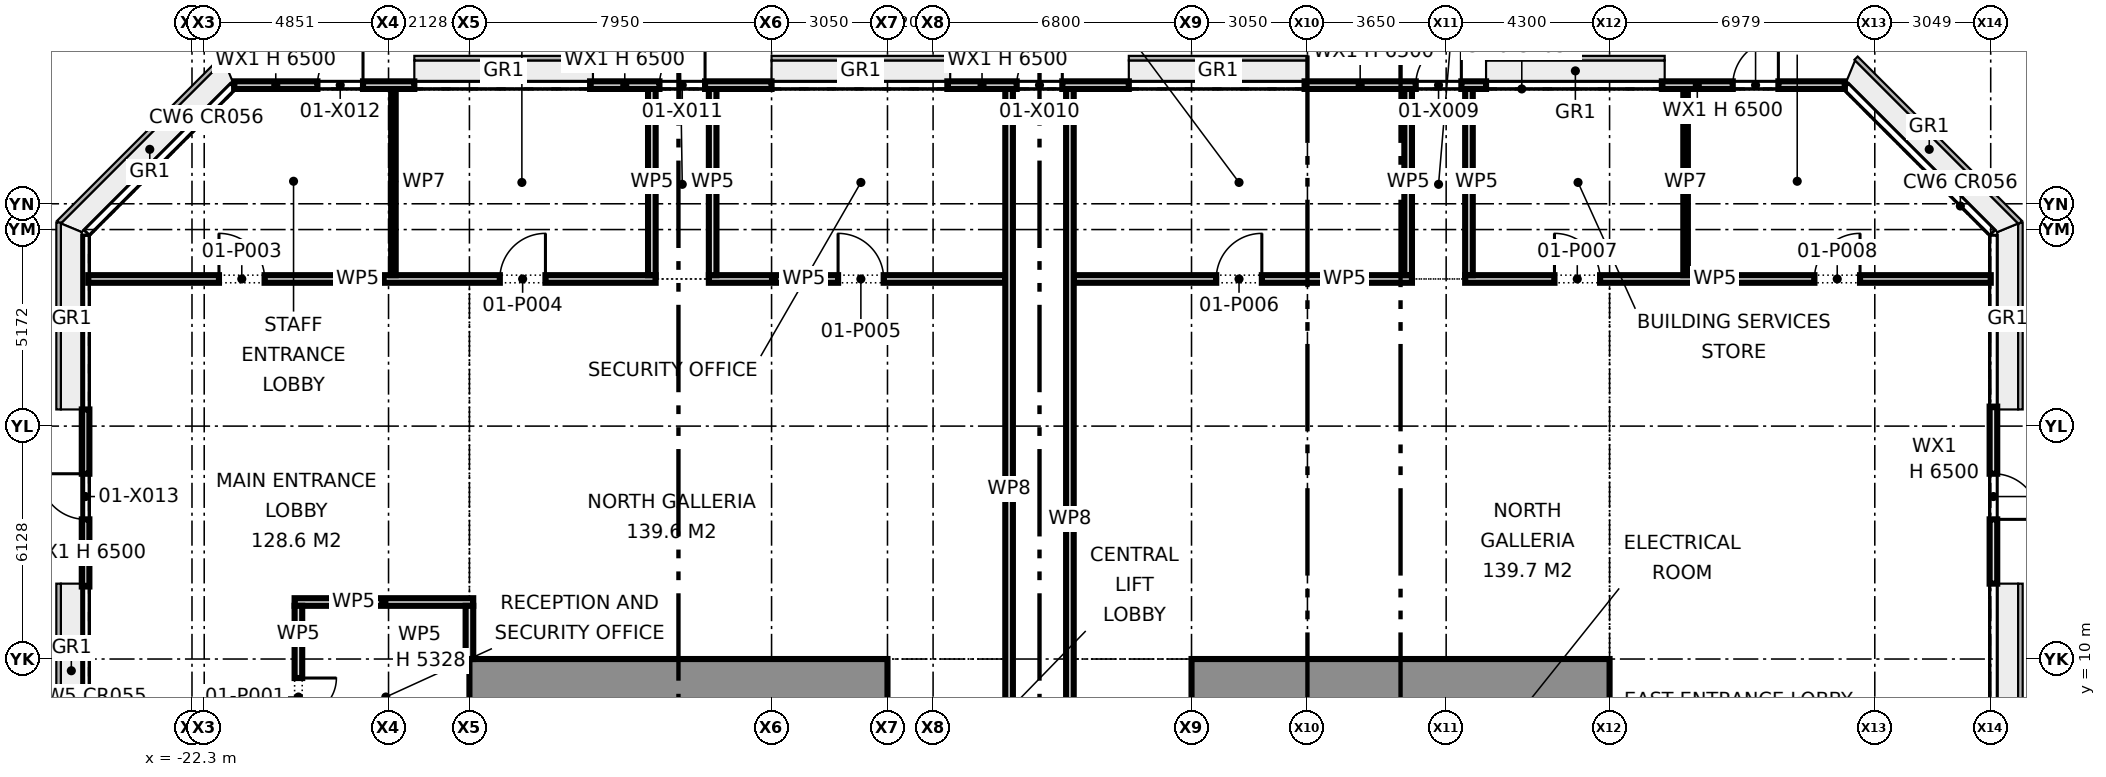
"""IFC4 building model, lengths in metres.
Left out: names, types, materials, properties, quantities, classifications, styles, units other than length and angle.
Written with IfcOpenShell. Run it as: python <this file> out.ifc"""

import sys

from ifc_helpers import new_model, si_unit, direction, frame, frame_2d, origin, place, context, subcontext, project, spatial, rectangle, extrude, element, fill, save


model = new_model("IFC4")
c1 = context("Model", 3, precision=1e-05, world=origin(), true_north=direction((0.0, 1.0)))
c2 = subcontext(c1, "Body", "Model", "MODEL_VIEW")
j1 = project(units=[si_unit("LENGTHUNIT", "METRE"), si_unit("PLANEANGLEUNIT", "RADIAN")], contexts=[c1])
p1 = place(None, origin())
s1 = spatial("IfcSite", under=j1, at=p1, CompositionType="ELEMENT")
p2 = place(p1, origin())
s2 = spatial("IfcBuilding", under=s1, at=p2, CompositionType="ELEMENT")
p3 = place(p2, origin())
s3 = spatial("IfcBuildingStorey", under=s2, at=p3, CompositionType="ELEMENT", Elevation=0.0)
p4 = place(p3, frame((25.1, 11.983, 0.0), z_axis=(0.0, 0.0, 1.0), x_axis=(0.0, 1.0, 0.0)))
e1 = element("IfcWall", 1, at=p4, inside=s3, PredefinedType="STANDARD", context=c2, shape_type="SweptSolid", body=[
    extrude(rectangle(XDim=4.658, YDim=0.2, at=frame_2d((2.329, 0.0))), origin(), (0.0, 0.0, 1.0), 6.5),
])
p5 = place(p4, frame((1.692, 0.0, 0.0)))
e2 = element("IfcOpeningElement", 2, at=p5, cuts=e1, PredefinedType="OPENING", context=c2, shape_type="SweptSolid", body=[
    extrude(rectangle(XDim=1.2, YDim=2.1, at=frame_2d((0.6, 1.05))), frame((0.0, 0.11, 0.0), z_axis=(0.0, -1.0, 0.0), x_axis=(1.0, 0.0, 0.0)), (0.0, 0.0, 1.0), 0.22),
])
p6 = place(p3, frame((21.191, 25.1, 0.0), z_axis=(0.0, 0.0, 1.0), x_axis=(-1.0, 0.0, 0.0)))
e3 = element("IfcWall", 3, at=p6, inside=s3, PredefinedType="STANDARD", context=c2, shape_type="SweptSolid", body=[
    extrude(rectangle(XDim=4.816, YDim=0.2, at=frame_2d((2.408, 0.0))), origin(), (0.0, 0.0, 1.0), 6.5),
])
p7 = place(p6, frame((1.75, 0.0, 0.0)))
e4 = element("IfcOpeningElement", 4, at=p7, cuts=e3, PredefinedType="OPENING", context=c2, shape_type="SweptSolid", body=[
    extrude(rectangle(XDim=1.2, YDim=2.1, at=frame_2d((0.6, 1.05))), frame((0.0, 0.11, 0.0), z_axis=(0.0, -1.0, 0.0), x_axis=(1.0, 0.0, 0.0)), (0.0, 0.0, 1.0), 0.22),
])
p8 = place(p3, frame((11.75, 25.1, 0.0), z_axis=(0.0, 0.0, 1.0), x_axis=(-1.0, 0.0, 0.0)))
e5 = element("IfcWall", 5, at=p8, inside=s3, PredefinedType="STANDARD", context=c2, shape_type="SweptSolid", body=[
    extrude(rectangle(XDim=4.775, YDim=0.2, at=frame_2d((2.387, 0.0))), origin(), (0.0, 0.0, 1.0), 6.5),
])
p9 = place(p8, frame((0.65, 0.0, 0.0)))
e6 = element("IfcOpeningElement", 6, at=p9, cuts=e5, PredefinedType="OPENING", context=c2, shape_type="SweptSolid", body=[
    extrude(rectangle(XDim=1.2, YDim=2.1, at=frame_2d((0.6, 1.05))), frame((0.0, 0.11, 0.0), z_axis=(0.0, -1.0, 0.0), x_axis=(1.0, 0.0, 0.0)), (0.0, 0.0, 1.0), 0.22),
])
p10 = place(p3, frame((2.35, 25.1, 0.0), z_axis=(0.0, 0.0, 1.0), x_axis=(-1.0, 0.0, 0.0)))
e7 = element("IfcWall", 7, at=p10, inside=s3, PredefinedType="STANDARD", context=c2, shape_type="SweptSolid", body=[
    extrude(rectangle(XDim=4.775, YDim=0.2, at=frame_2d((2.388, 0.0))), origin(), (0.0, 0.0, 1.0), 6.5),
])
p11 = place(p10, frame((1.75, 0.0, 0.0)))
e8 = element("IfcOpeningElement", 8, at=p11, cuts=e7, PredefinedType="OPENING", context=c2, shape_type="SweptSolid", body=[
    extrude(rectangle(XDim=1.2, YDim=2.1, at=frame_2d((0.6, 1.05))), frame((0.0, 0.11, 0.0), z_axis=(0.0, -1.0, 0.0), x_axis=(1.0, 0.0, 0.0)), (0.0, 0.0, 1.0), 0.22),
])
p12 = place(p3, frame((-7.05, 25.1, 0.0), z_axis=(0.0, 0.0, 1.0), x_axis=(-1.0, 0.0, 0.0)))
e9 = element("IfcWall", 9, at=p12, inside=s3, PredefinedType="STANDARD", context=c2, shape_type="SweptSolid", body=[
    extrude(rectangle(XDim=4.775, YDim=0.2, at=frame_2d((2.387, 0.0))), origin(), (0.0, 0.0, 1.0), 6.5),
])
p13 = place(p12, frame((1.75, 0.0, 0.0)))
e10 = element("IfcOpeningElement", 10, at=p13, cuts=e9, PredefinedType="OPENING", context=c2, shape_type="SweptSolid", body=[
    extrude(rectangle(XDim=1.2, YDim=2.1, at=frame_2d((0.6, 1.05))), frame((0.0, 0.11, 0.0), z_axis=(0.0, -1.0, 0.0), x_axis=(1.0, 0.0, 0.0)), (0.0, 0.0, 1.0), 0.22),
])
p14 = place(p3, frame((-16.45, 25.1, 0.0), z_axis=(0.0, 0.0, 1.0), x_axis=(-1.0, 0.0, 0.0)))
e11 = element("IfcWall", 11, at=p14, inside=s3, PredefinedType="STANDARD", context=c2, shape_type="SweptSolid", body=[
    extrude(rectangle(XDim=4.741, YDim=0.2, at=frame_2d((2.371, 0.0))), origin(), (0.0, 0.0, 1.0), 6.5),
])
p15 = place(p14, frame((1.35, 0.0, 0.0)))
e12 = element("IfcOpeningElement", 12, at=p15, cuts=e11, PredefinedType="OPENING", context=c2, shape_type="SweptSolid", body=[
    extrude(rectangle(XDim=1.2, YDim=2.1, at=frame_2d((0.6, 1.05))), frame((0.0, 0.11, 0.0), z_axis=(0.0, -1.0, 0.0), x_axis=(1.0, 0.0, 0.0)), (0.0, 0.0, 1.0), 0.22),
])
p16 = place(p3, frame((-25.1, 16.567, 0.0), z_axis=(0.0, 0.0, 1.0), x_axis=(0.0, -1.0, 0.0)))
e13 = element("IfcWall", 13, at=p16, inside=s3, PredefinedType="STANDARD", context=c2, shape_type="SweptSolid", body=[
    extrude(rectangle(XDim=4.658, YDim=0.2, at=frame_2d((2.329, 0.0))), origin(), (0.0, 0.0, 1.0), 6.5),
])
p17 = place(p16, frame((1.692, 0.0, 0.0)))
e14 = element("IfcOpeningElement", 14, at=p17, cuts=e13, PredefinedType="OPENING", context=c2, shape_type="SweptSolid", body=[
    extrude(rectangle(XDim=1.2, YDim=2.1, at=frame_2d((0.6, 1.05))), frame((0.0, 0.11, 0.0), z_axis=(0.0, -1.0, 0.0), x_axis=(1.0, 0.0, 0.0)), (0.0, 0.0, 1.0), 0.22),
])
for number, where, z_axis, x_axis in (
    (15, (-15.0, 9.45, 0.0), (0.0, 0.0, 1.0), (1.0, 0.0, 0.0)),
    (16, (15.0, 9.45, 0.0), (0.0, 0.0, 1.0), (-1.0, 0.0, 0.0)),
):
    element("IfcWall", number, at=place(p3, frame(where, z_axis=z_axis, x_axis=x_axis)), inside=s3, PredefinedType="SHEAR", context=c2, shape_type="SweptSolid", body=[
        extrude(rectangle(XDim=11.0, YDim=1.1, at=frame_2d((5.5, 0.0))), origin(), (0.0, 0.0, 1.0), 6.275),
    ])
p18 = place(p3, frame((-19.6, 11.5, 0.0), z_axis=(0.0, 0.0, 1.0), x_axis=(1.0, 0.0, 0.0)))
e17 = element("IfcWall", 17, at=p18, inside=s3, PredefinedType="PARTITIONING", context=c2, shape_type="SweptSolid", body=[
    extrude(rectangle(XDim=4.7, YDim=0.2, at=frame_2d((2.35, 0.0))), origin(), (0.0, 0.0, 1.0), 6.275),
])
p19 = place(p3, frame((-25.03, 20.0, 0.0), z_axis=(0.0, 0.0, 1.0), x_axis=(1.0, 0.0, 0.0)))
e18 = element("IfcWall", 18, at=p19, inside=s3, PredefinedType="PARTITIONING", context=c2, shape_type="SweptSolid", body=[
    extrude(rectangle(XDim=14.93, YDim=0.2, at=frame_2d((7.465, 0.0))), origin(), (0.0, 0.0, 1.0), 6.275),
])
p20 = place(p19, frame((3.44, 0.0, 0.0)))
e19 = element("IfcOpeningElement", 19, at=p20, cuts=e18, PredefinedType="OPENING", context=c2, shape_type="SweptSolid", body=[
    extrude(rectangle(XDim=1.2, YDim=2.1, at=frame_2d((0.6, 1.05))), frame((0.0, 0.11, 0.0), z_axis=(0.0, -1.0, 0.0), x_axis=(1.0, 0.0, 0.0)), (0.0, 0.0, 1.0), 0.22),
])
p21 = place(p19, frame((10.83, 0.0, 0.0)))
e20 = element("IfcOpeningElement", 20, at=p21, cuts=e18, PredefinedType="OPENING", context=c2, shape_type="SweptSolid", body=[
    extrude(rectangle(XDim=1.2, YDim=2.1, at=frame_2d((0.6, 1.05))), frame((0.0, 0.11, 0.0), z_axis=(0.0, -1.0, 0.0), x_axis=(1.0, 0.0, 0.0)), (0.0, 0.0, 1.0), 0.22),
])
p22 = place(p3, frame((-8.7, 20.0, 0.0), z_axis=(0.0, 0.0, 1.0), x_axis=(1.0, 0.0, 0.0)))
e21 = element("IfcWall", 21, at=p22, inside=s3, PredefinedType="PARTITIONING", context=c2, shape_type="SweptSolid", body=[
    extrude(rectangle(XDim=7.8, YDim=0.2, at=frame_2d((3.9, 0.0))), origin(), (0.0, 0.0, 1.0), 6.275),
])
p23 = place(p22, frame((3.4, 0.0, 0.0)))
e22 = element("IfcOpeningElement", 22, at=p23, cuts=e21, PredefinedType="OPENING", context=c2, shape_type="SweptSolid", body=[
    extrude(rectangle(XDim=1.2, YDim=2.1, at=frame_2d((0.6, 1.05))), frame((0.0, 0.11, 0.0), z_axis=(0.0, -1.0, 0.0), x_axis=(1.0, 0.0, 0.0)), (0.0, 0.0, 1.0), 0.22),
])
p24 = place(p3, frame((0.9, 20.0, 0.0), z_axis=(0.0, 0.0, 1.0), x_axis=(1.0, 0.0, 0.0)))
e23 = element("IfcWall", 23, at=p24, inside=s3, PredefinedType="PARTITIONING", context=c2, shape_type="SweptSolid", body=[
    extrude(rectangle(XDim=8.9, YDim=0.2, at=frame_2d((4.45, 0.0))), origin(), (0.0, 0.0, 1.0), 6.275),
])
p25 = place(p24, frame((3.75, 0.0, 0.0)))
e24 = element("IfcOpeningElement", 24, at=p25, cuts=e23, PredefinedType="OPENING", context=c2, shape_type="SweptSolid", body=[
    extrude(rectangle(XDim=1.2, YDim=2.1, at=frame_2d((0.6, 1.05))), frame((0.0, 0.11, 0.0), z_axis=(0.0, -1.0, 0.0), x_axis=(1.0, 0.0, 0.0)), (0.0, 0.0, 1.0), 0.22),
])
p26 = place(p3, frame((11.2, 20.0, 0.0), z_axis=(0.0, 0.0, 1.0), x_axis=(1.0, 0.0, 0.0)))
e25 = element("IfcWall", 25, at=p26, inside=s3, PredefinedType="PARTITIONING", context=c2, shape_type="SweptSolid", body=[
    extrude(rectangle(XDim=13.83, YDim=0.2, at=frame_2d((6.915, 0.0))), origin(), (0.0, 0.0, 1.0), 6.275),
])
p27 = place(p26, frame((2.35, 0.0, 0.0)))
e26 = element("IfcOpeningElement", 26, at=p27, cuts=e25, PredefinedType="OPENING", context=c2, shape_type="SweptSolid", body=[
    extrude(rectangle(XDim=1.2, YDim=2.1, at=frame_2d((0.6, 1.05))), frame((0.0, 0.11, 0.0), z_axis=(0.0, -1.0, 0.0), x_axis=(1.0, 0.0, 0.0)), (0.0, 0.0, 1.0), 0.22),
])
p28 = place(p26, frame((9.19, 0.0, 0.0)))
e27 = element("IfcOpeningElement", 27, at=p28, cuts=e25, PredefinedType="OPENING", context=c2, shape_type="SweptSolid", body=[
    extrude(rectangle(XDim=1.2, YDim=2.1, at=frame_2d((0.6, 1.05))), frame((0.0, 0.11, 0.0), z_axis=(0.0, -1.0, 0.0), x_axis=(1.0, 0.0, 0.0)), (0.0, 0.0, 1.0), 0.22),
])
for number, where, z_axis, x_axis in (
    (28, (11.3, 20.1, 0.0), (0.0, 0.0, 1.0), (0.0, 1.0, 0.0)),
    (29, (9.7, 20.1, 0.0), (0.0, 0.0, 1.0), (0.0, 1.0, 0.0)),
    (30, (-8.6, 20.1, 0.0), (0.0, 0.0, 1.0), (0.0, 1.0, 0.0)),
    (31, (-10.2, 20.1, 0.0), (0.0, 0.0, 1.0), (0.0, 1.0, 0.0)),
):
    element("IfcWall", number, at=place(p3, frame(where, z_axis=z_axis, x_axis=x_axis)), inside=s3, PredefinedType="PARTITIONING", context=c2, shape_type="SweptSolid", body=[
        extrude(rectangle(XDim=4.93, YDim=0.2, at=frame_2d((2.465, 0.0))), origin(), (0.0, 0.0, 1.0), 6.275),
    ])
p29 = place(p3, frame((-15.0, 10.0, 0.0), z_axis=(0.0, 0.0, 1.0), x_axis=(0.0, 1.0, 0.0)))
e32 = element("IfcWall", 32, at=p29, inside=s3, PredefinedType="PARTITIONING", context=c2, shape_type="SweptSolid", body=[
    extrude(rectangle(XDim=1.4, YDim=0.2, at=frame_2d((0.7, 0.0))), origin(), (0.0, 0.0, 1.0), 5.328),
])
p30 = place(p3, frame((-19.5, 6.6, 0.0), z_axis=(0.0, 0.0, 1.0), x_axis=(0.0, 1.0, 0.0)))
e33 = element("IfcWall", 33, at=p30, inside=s3, PredefinedType="PARTITIONING", context=c2, shape_type="SweptSolid", body=[
    extrude(rectangle(XDim=4.8, YDim=0.2, at=frame_2d((2.4, 0.0))), origin(), (0.0, 0.0, 1.0), 6.275),
])
p31 = place(p30, frame((1.9, 0.0, 0.0)))
e34 = element("IfcOpeningElement", 34, at=p31, cuts=e33, PredefinedType="OPENING", context=c2, shape_type="SweptSolid", body=[
    extrude(rectangle(XDim=1.0, YDim=2.1, at=frame_2d((0.5, 1.05))), frame((0.0, 0.11, 0.0), z_axis=(0.0, -1.0, 0.0), x_axis=(1.0, 0.0, 0.0)), (0.0, 0.0, 1.0), 0.22),
])
for number, where, z_axis, x_axis in (
    (35, (17.0, 20.1, 0.0), (0.0, 0.0, 1.0), (0.0, 1.0, 0.0)),
    (36, (-17.0, 20.1, 0.0), (0.0, 0.0, 1.0), (0.0, 1.0, 0.0)),
):
    element("IfcWall", number, at=place(p3, frame(where, z_axis=z_axis, x_axis=x_axis)), inside=s3, PredefinedType="PARTITIONING", context=c2, shape_type="SweptSolid", body=[
        extrude(rectangle(XDim=4.93, YDim=0.12, at=frame_2d((2.465, 0.0))), origin(), (0.0, 0.0, 1.0), 6.275),
    ])
p32 = place(p3, frame((0.8, 2.33, 0.0), z_axis=(0.0, 0.0, 1.0), x_axis=(0.0, 1.0, 0.0)))
e37 = element("IfcWall", 37, at=p32, inside=s3, PredefinedType="PARTITIONING", context=c2, shape_type="SweptSolid", body=[
    extrude(rectangle(XDim=22.7, YDim=0.2, at=frame_2d((11.35, 0.0))), origin(), (0.0, 0.0, 1.0), 6.275),
])
p33 = place(p3, frame((-0.8, 3.93, 0.0), z_axis=(0.0, 0.0, 1.0), x_axis=(0.0, 1.0, 0.0)))
e38 = element("IfcWall", 38, at=p33, inside=s3, PredefinedType="PARTITIONING", context=c2, shape_type="SweptSolid", body=[
    extrude(rectangle(XDim=21.1, YDim=0.2, at=frame_2d((10.55, 0.0))), origin(), (0.0, 0.0, 1.0), 6.275),
])
p34 = place(p5, frame((1.2, 0.0, 0.0), z_axis=(0.0, 0.0, 1.0), x_axis=(-1.0, 0.0, 0.0)))
e39 = element("IfcDoor", 39, at=p34, inside=s3, OperationType="SINGLE_SWING_RIGHT", PredefinedType="DOOR", context=c2, shape_type="SweptSolid", body=[
    extrude(rectangle(XDim=1.2, YDim=2.1, at=frame_2d((0.6, 1.05))), frame((0.0, 0.025, 0.0), z_axis=(0.0, -1.0, 0.0), x_axis=(1.0, 0.0, 0.0)), (0.0, 0.0, 1.0), 0.05),
])
fill(e2, e39)
p35 = place(p7, frame((1.2, 0.0, 0.0), z_axis=(0.0, 0.0, 1.0), x_axis=(-1.0, 0.0, 0.0)))
e40 = element("IfcDoor", 40, at=p35, inside=s3, OperationType="SINGLE_SWING_RIGHT", PredefinedType="DOOR", context=c2, shape_type="SweptSolid", body=[
    extrude(rectangle(XDim=1.2, YDim=2.1, at=frame_2d((0.6, 1.05))), frame((0.0, 0.025, 0.0), z_axis=(0.0, -1.0, 0.0), x_axis=(1.0, 0.0, 0.0)), (0.0, 0.0, 1.0), 0.05),
])
fill(e4, e40)
p36 = place(p9, frame((1.2, 0.0, 0.0), z_axis=(0.0, 0.0, 1.0), x_axis=(-1.0, 0.0, 0.0)))
e41 = element("IfcDoor", 41, at=p36, inside=s3, OperationType="SINGLE_SWING_RIGHT", PredefinedType="DOOR", context=c2, shape_type="SweptSolid", body=[
    extrude(rectangle(XDim=1.2, YDim=2.1, at=frame_2d((0.6, 1.05))), frame((0.0, 0.025, 0.0), z_axis=(0.0, -1.0, 0.0), x_axis=(1.0, 0.0, 0.0)), (0.0, 0.0, 1.0), 0.05),
])
fill(e6, e41)
p37 = place(p11, frame((1.2, 0.0, 0.0), z_axis=(0.0, 0.0, 1.0), x_axis=(-1.0, 0.0, 0.0)))
e42 = element("IfcDoor", 42, at=p37, inside=s3, OperationType="SINGLE_SWING_RIGHT", PredefinedType="DOOR", context=c2, shape_type="SweptSolid", body=[
    extrude(rectangle(XDim=1.2, YDim=2.1, at=frame_2d((0.6, 1.05))), frame((0.0, 0.025, 0.0), z_axis=(0.0, -1.0, 0.0), x_axis=(1.0, 0.0, 0.0)), (0.0, 0.0, 1.0), 0.05),
])
fill(e8, e42)
p38 = place(p13, frame((1.2, 0.0, 0.0), z_axis=(0.0, 0.0, 1.0), x_axis=(-1.0, 0.0, 0.0)))
e43 = element("IfcDoor", 43, at=p38, inside=s3, OperationType="SINGLE_SWING_RIGHT", PredefinedType="DOOR", context=c2, shape_type="SweptSolid", body=[
    extrude(rectangle(XDim=1.2, YDim=2.1, at=frame_2d((0.6, 1.05))), frame((0.0, 0.025, 0.0), z_axis=(0.0, -1.0, 0.0), x_axis=(1.0, 0.0, 0.0)), (0.0, 0.0, 1.0), 0.05),
])
fill(e10, e43)
p39 = place(p15, frame((1.2, 0.0, 0.0), z_axis=(0.0, 0.0, 1.0), x_axis=(-1.0, 0.0, 0.0)))
e44 = element("IfcDoor", 44, at=p39, inside=s3, OperationType="SINGLE_SWING_RIGHT", PredefinedType="DOOR", context=c2, shape_type="SweptSolid", body=[
    extrude(rectangle(XDim=1.2, YDim=2.1, at=frame_2d((0.6, 1.05))), frame((0.0, 0.025, 0.0), z_axis=(0.0, -1.0, 0.0), x_axis=(1.0, 0.0, 0.0)), (0.0, 0.0, 1.0), 0.05),
])
fill(e12, e44)
p40 = place(p17, frame((1.2, 0.0, 0.0), z_axis=(0.0, 0.0, 1.0), x_axis=(-1.0, 0.0, 0.0)))
e45 = element("IfcDoor", 45, at=p40, inside=s3, OperationType="SINGLE_SWING_RIGHT", PredefinedType="DOOR", context=c2, shape_type="SweptSolid", body=[
    extrude(rectangle(XDim=1.2, YDim=2.1, at=frame_2d((0.6, 1.05))), frame((0.0, 0.025, 0.0), z_axis=(0.0, -1.0, 0.0), x_axis=(1.0, 0.0, 0.0)), (0.0, 0.0, 1.0), 0.05),
])
fill(e14, e45)
p41 = place(p31, frame((1.0, 0.0, 0.0), z_axis=(0.0, 0.0, 1.0), x_axis=(-1.0, 0.0, 0.0)))
e46 = element("IfcDoor", 46, at=p41, inside=s3, OperationType="SINGLE_SWING_LEFT", PredefinedType="DOOR", context=c2, shape_type="SweptSolid", body=[
    extrude(rectangle(XDim=1.0, YDim=2.1, at=frame_2d((0.5, 1.05))), frame((0.0, 0.025, 0.0), z_axis=(0.0, -1.0, 0.0), x_axis=(1.0, 0.0, 0.0)), (0.0, 0.0, 1.0), 0.05),
])
fill(e34, e46)
p42 = place(p20, origin())
e47 = element("IfcDoor", 47, at=p42, inside=s3, OperationType="SINGLE_SWING_LEFT", PredefinedType="DOOR", context=c2, shape_type="SweptSolid", body=[
    extrude(rectangle(XDim=1.2, YDim=2.1, at=frame_2d((0.6, 1.05))), frame((0.0, 0.025, 0.0), z_axis=(0.0, -1.0, 0.0), x_axis=(1.0, 0.0, 0.0)), (0.0, 0.0, 1.0), 0.05),
])
fill(e19, e47)
p43 = place(p21, origin())
e48 = element("IfcDoor", 48, at=p43, inside=s3, OperationType="SINGLE_SWING_RIGHT", PredefinedType="DOOR", context=c2, shape_type="SweptSolid", body=[
    extrude(rectangle(XDim=1.2, YDim=2.1, at=frame_2d((0.6, 1.05))), frame((0.0, 0.025, 0.0), z_axis=(0.0, -1.0, 0.0), x_axis=(1.0, 0.0, 0.0)), (0.0, 0.0, 1.0), 0.05),
])
fill(e20, e48)
p44 = place(p23, origin())
e49 = element("IfcDoor", 49, at=p44, inside=s3, OperationType="SINGLE_SWING_LEFT", PredefinedType="DOOR", context=c2, shape_type="SweptSolid", body=[
    extrude(rectangle(XDim=1.2, YDim=2.1, at=frame_2d((0.6, 1.05))), frame((0.0, 0.025, 0.0), z_axis=(0.0, -1.0, 0.0), x_axis=(1.0, 0.0, 0.0)), (0.0, 0.0, 1.0), 0.05),
])
fill(e22, e49)
p45 = place(p25, origin())
e50 = element("IfcDoor", 50, at=p45, inside=s3, OperationType="SINGLE_SWING_RIGHT", PredefinedType="DOOR", context=c2, shape_type="SweptSolid", body=[
    extrude(rectangle(XDim=1.2, YDim=2.1, at=frame_2d((0.6, 1.05))), frame((0.0, 0.025, 0.0), z_axis=(0.0, -1.0, 0.0), x_axis=(1.0, 0.0, 0.0)), (0.0, 0.0, 1.0), 0.05),
])
fill(e24, e50)
p46 = place(p27, origin())
e51 = element("IfcDoor", 51, at=p46, inside=s3, OperationType="SINGLE_SWING_LEFT", PredefinedType="DOOR", context=c2, shape_type="SweptSolid", body=[
    extrude(rectangle(XDim=1.2, YDim=2.1, at=frame_2d((0.6, 1.05))), frame((0.0, 0.025, 0.0), z_axis=(0.0, -1.0, 0.0), x_axis=(1.0, 0.0, 0.0)), (0.0, 0.0, 1.0), 0.05),
])
fill(e26, e51)
p47 = place(p28, origin())
e52 = element("IfcDoor", 52, at=p47, inside=s3, OperationType="SINGLE_SWING_RIGHT", PredefinedType="DOOR", context=c2, shape_type="SweptSolid", body=[
    extrude(rectangle(XDim=1.2, YDim=2.1, at=frame_2d((0.6, 1.05))), frame((0.0, 0.025, 0.0), z_axis=(0.0, -1.0, 0.0), x_axis=(1.0, 0.0, 0.0)), (0.0, 0.0, 1.0), 0.05),
])
fill(e27, e52)
save(model, sys.argv[1])
